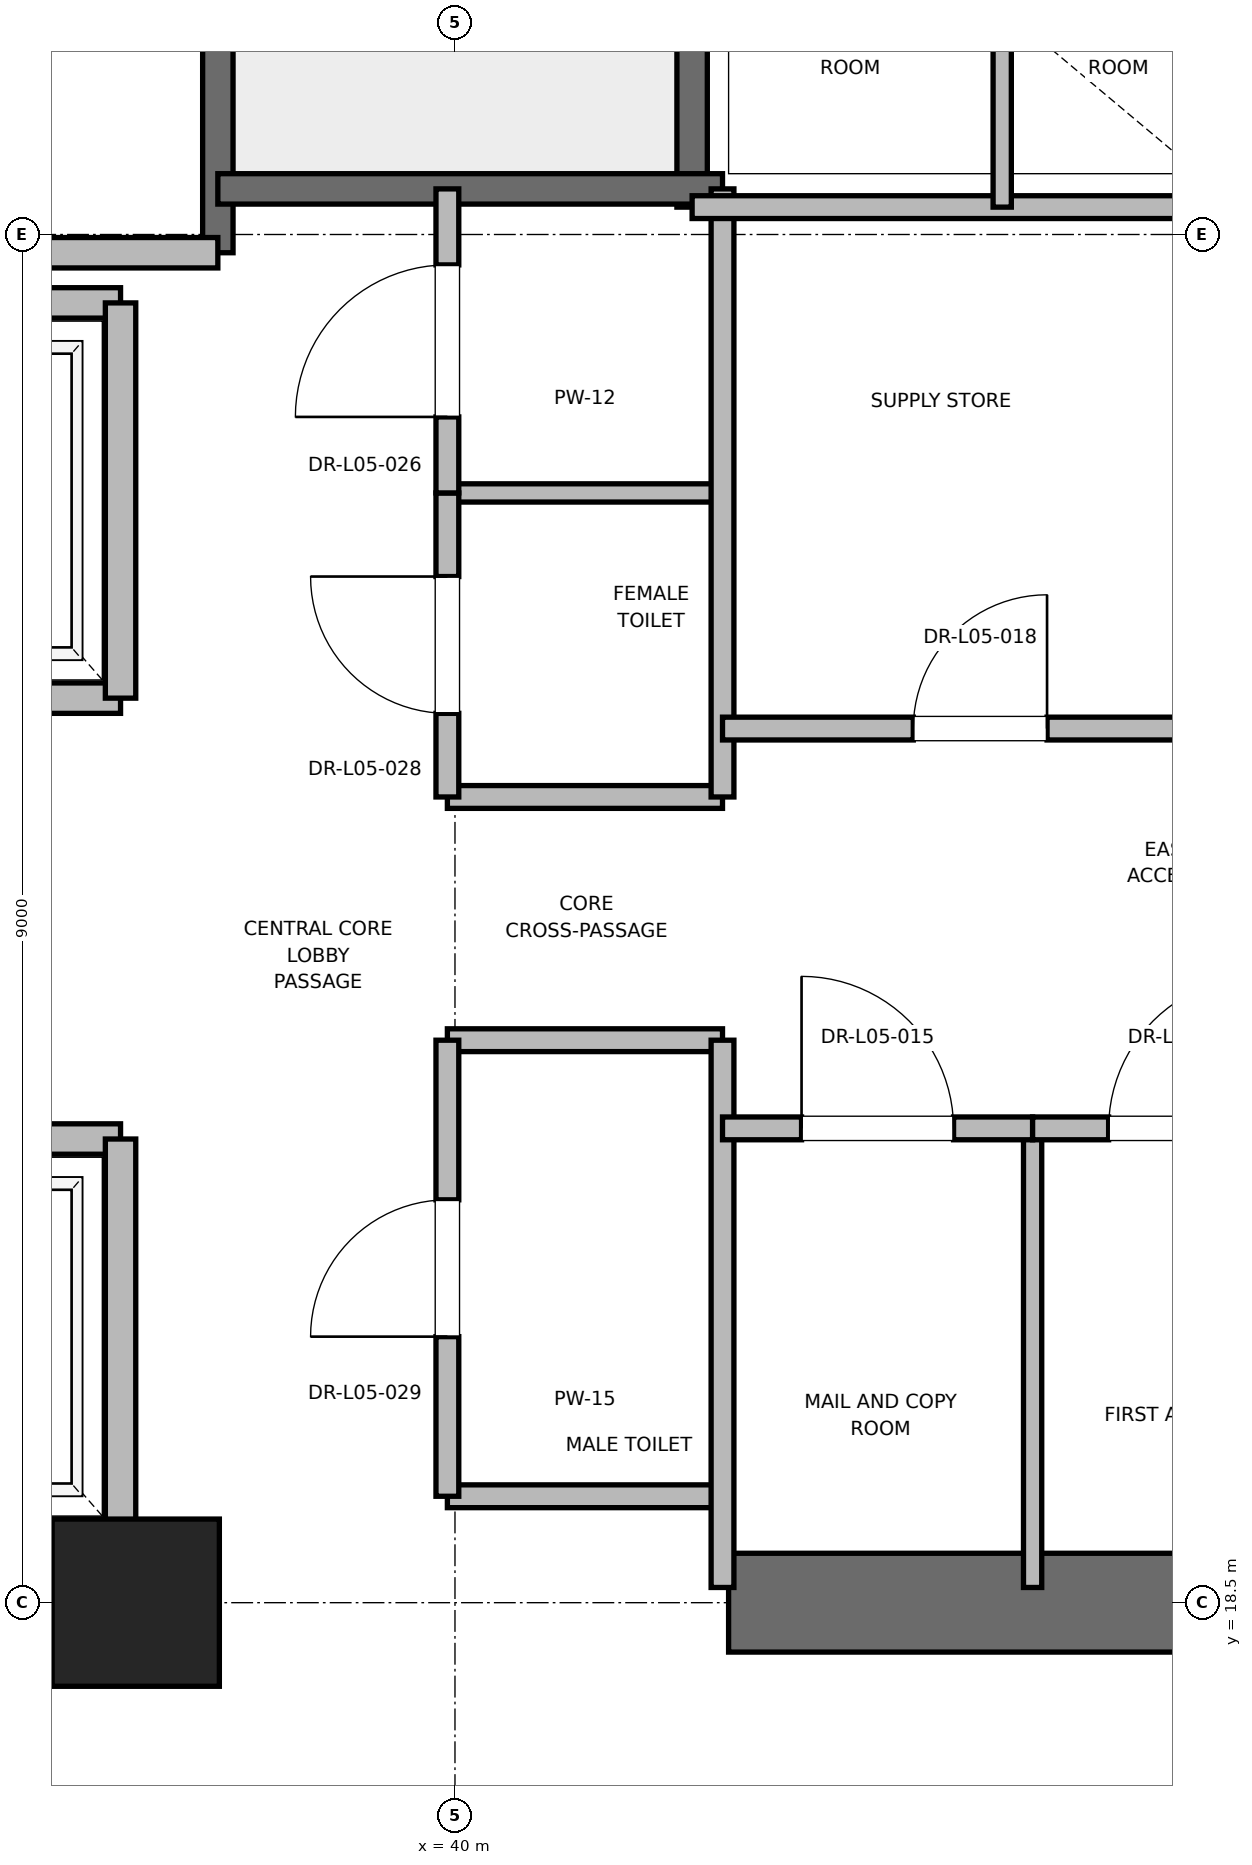
"""IFC4 building model, lengths in metres.
Left out: names, types, materials, properties, quantities, classifications, styles, units other than length and angle.
Written with IfcOpenShell. Run it as: python <this file> out.ifc"""

import sys

from ifc_helpers import new_model, si_unit, direction, frame, frame_2d, origin, origin_2d, place, context, subcontext, project, spatial, rectangle, extrude, element, fill, save


model = new_model("IFC4")
c1 = context("Model", 3, precision=1e-05, world=origin(), true_north=direction((0.0, 1.0)))
c2 = subcontext(c1, "Body", "Model", "MODEL_VIEW")
j1 = project(units=[si_unit("LENGTHUNIT", "METRE"), si_unit("PLANEANGLEUNIT", "RADIAN")], contexts=[c1])
p1 = place(None, origin())
s1 = spatial("IfcSite", under=j1, at=p1, CompositionType="ELEMENT")
p2 = place(p1, origin())
s2 = spatial("IfcBuilding", under=s1, at=p2, CompositionType="ELEMENT")
p3 = place(p2, frame((0.0, 0.0, 27.6)))
s3 = spatial("IfcBuildingStorey", under=s2, at=p3, CompositionType="ELEMENT", Elevation=27.6)
p4 = place(p3, frame((37.9, 18.5, 0.0), z_axis=(0.0, 0.0, 1.0), x_axis=(1.0, 0.0, 0.0)))
e1 = element("IfcColumn", 1, at=p4, inside=s3, PredefinedType="PILASTER", context=c2, shape_type="SweptSolid", body=[
    extrude(rectangle(XDim=1.1, YDim=1.1, at=origin_2d()), origin(), (0.0, 0.0, 1.0), 4.0),
])
for number, where, z_axis, x_axis in (
    (2, (29.0, 18.5, 0.0), (0.0, 0.0, 1.0), (1.0, 0.0, 0.0)),
    (3, (41.8, 18.5, 0.0), (0.0, 0.0, 1.0), (1.0, 0.0, 0.0)),
):
    element("IfcWall", number, at=place(p3, frame(where, z_axis=z_axis, x_axis=x_axis)), inside=s3, PredefinedType="SHEAR", context=c2, shape_type="SweptSolid", body=[
        extrude(rectangle(XDim=9.2, YDim=0.65, at=frame_2d((4.6, 0.0))), origin(), (0.0, 0.0, 1.0), 3.76),
    ])
p5 = place(p3, frame((38.44, 27.38, 0.0), z_axis=(0.0, 0.0, 1.0), x_axis=(0.0, 1.0, 0.0)))
e4 = element("IfcWall", 4, at=p5, inside=s3, PredefinedType="SOLIDWALL", context=c2, shape_type="SweptSolid", body=[
    extrude(rectangle(XDim=8.87, YDim=0.2, at=frame_2d((4.435, 0.0))), origin(), (0.0, 0.0, 1.0), 3.76),
])
p6 = place(p3, frame((41.56, 27.68, 0.0), z_axis=(0.0, 0.0, 1.0), x_axis=(0.0, 1.0, 0.0)))
e5 = element("IfcWall", 5, at=p6, inside=s3, PredefinedType="SOLIDWALL", context=c2, shape_type="SweptSolid", body=[
    extrude(rectangle(XDim=8.57, YDim=0.2, at=frame_2d((4.285, 0.0))), origin(), (0.0, 0.0, 1.0), 3.76),
])
p7 = place(p3, frame((38.44, 27.8, 0.0), z_axis=(0.0, 0.0, 1.0), x_axis=(1.0, 0.0, 0.0)))
e6 = element("IfcWall", 6, at=p7, inside=s3, PredefinedType="SOLIDWALL", context=c2, shape_type="SweptSolid", body=[
    extrude(rectangle(XDim=3.32, YDim=0.2, at=frame_2d((1.66, 0.0))), origin(), (0.0, 0.0, 1.0), 3.76),
])
p8 = place(p3, frame((32.82, 27.38, 0.0), z_axis=(0.0, 0.0, 1.0), x_axis=(1.0, 0.0, 0.0)))
e7 = element("IfcWall", 7, at=p8, inside=s3, PredefinedType="PARTITIONING", context=c2, shape_type="SweptSolid", body=[
    extrude(rectangle(XDim=5.62, YDim=0.2, at=frame_2d((2.81, 0.0))), origin(), (0.0, 0.0, 1.0), 3.76),
])
p9 = place(p3, frame((35.5, 18.95, 0.0), z_axis=(0.0, 0.0, 1.0), x_axis=(1.0, 0.0, 0.0)))
e8 = element("IfcWall", 8, at=p9, inside=s3, PredefinedType="SOLIDWALL", context=c2, shape_type="SweptSolid", body=[
    extrude(rectangle(XDim=2.3, YDim=0.2, at=frame_2d((1.15, 0.0))), origin(), (0.0, 0.0, 1.0), 2.54),
])
p10 = place(p3, frame((37.8, 21.55, 0.0), z_axis=(0.0, 0.0, 1.0), x_axis=(-1.0, 0.0, 0.0)))
e9 = element("IfcWall", 9, at=p10, inside=s3, PredefinedType="SOLIDWALL", context=c2, shape_type="SweptSolid", body=[
    extrude(rectangle(XDim=2.3, YDim=0.2, at=frame_2d((1.15, 0.0))), origin(), (0.0, 0.0, 1.0), 3.76),
])
p11 = place(p10, frame((0.6, 0.0, 0.0)))
e10 = element("IfcOpeningElement", 10, at=p11, cuts=e9, PredefinedType="OPENING", context=c2, shape_type="SweptSolid", body=[
    extrude(rectangle(XDim=1.1, YDim=2.2, at=frame_2d((0.55, 1.1))), frame((0.0, 0.1, 0.0), z_axis=(0.0, -1.0, 0.0), x_axis=(1.0, 0.0, 0.0)), (0.0, 0.0, 1.0), 0.2),
])
p12 = place(p3, frame((37.8, 18.95, 0.0), z_axis=(0.0, 0.0, 1.0), x_axis=(0.0, 1.0, 0.0)))
e11 = element("IfcWall", 11, at=p12, inside=s3, PredefinedType="SOLIDWALL", context=c2, shape_type="SweptSolid", body=[
    extrude(rectangle(XDim=2.6, YDim=0.2, at=frame_2d((1.3, 0.0))), origin(), (0.0, 0.0, 1.0), 2.54),
])
p13 = place(p3, frame((35.5, 24.45, 0.0), z_axis=(0.0, 0.0, 1.0), x_axis=(1.0, 0.0, 0.0)))
e12 = element("IfcWall", 12, at=p13, inside=s3, PredefinedType="SOLIDWALL", context=c2, shape_type="SweptSolid", body=[
    extrude(rectangle(XDim=2.3, YDim=0.2, at=frame_2d((1.15, 0.0))), origin(), (0.0, 0.0, 1.0), 3.76),
])
p14 = place(p13, frame((0.6, 0.0, 0.0)))
e13 = element("IfcOpeningElement", 13, at=p14, cuts=e12, PredefinedType="OPENING", context=c2, shape_type="SweptSolid", body=[
    extrude(rectangle(XDim=1.1, YDim=2.2, at=frame_2d((0.55, 1.1))), frame((0.0, 0.1, 0.0), z_axis=(0.0, -1.0, 0.0), x_axis=(1.0, 0.0, 0.0)), (0.0, 0.0, 1.0), 0.2),
])
p15 = place(p3, frame((37.8, 27.05, 0.0), z_axis=(0.0, 0.0, 1.0), x_axis=(-1.0, 0.0, 0.0)))
e14 = element("IfcWall", 14, at=p15, inside=s3, PredefinedType="SOLIDWALL", context=c2, shape_type="SweptSolid", body=[
    extrude(rectangle(XDim=2.3, YDim=0.2, at=frame_2d((1.15, 0.0))), origin(), (0.0, 0.0, 1.0), 3.76),
])
p16 = place(p3, frame((37.8, 24.45, 0.0), z_axis=(0.0, 0.0, 1.0), x_axis=(0.0, 1.0, 0.0)))
e15 = element("IfcWall", 15, at=p16, inside=s3, PredefinedType="SOLIDWALL", context=c2, shape_type="SweptSolid", body=[
    extrude(rectangle(XDim=2.6, YDim=0.2, at=frame_2d((1.3, 0.0))), origin(), (0.0, 0.0, 1.0), 3.76),
])
for number, where, z_axis, x_axis in (
    (16, (39.95, 19.2, 0.0), (0.0, 0.0, 1.0), (1.0, 0.0, 0.0)),
    (17, (39.95, 22.2, 0.0), (0.0, 0.0, 1.0), (1.0, 0.0, 0.0)),
    (18, (39.95, 23.8, 0.0), (0.0, 0.0, 1.0), (1.0, 0.0, 0.0)),
):
    element("IfcWall", number, at=place(p3, frame(where, z_axis=z_axis, x_axis=x_axis)), inside=s3, PredefinedType="PARTITIONING", context=c2, shape_type="SweptSolid", body=[
        extrude(rectangle(XDim=1.81, YDim=0.15, at=frame_2d((0.905, 0.0))), origin(), (0.0, 0.0, 1.0), 2.85),
    ])
p17 = place(p3, frame((39.95, 25.8, 0.0), z_axis=(0.0, 0.0, 1.0), x_axis=(1.0, 0.0, 0.0)))
e19 = element("IfcWall", 19, at=p17, inside=s3, PredefinedType="PARTITIONING", context=c2, shape_type="SweptSolid", body=[
    extrude(rectangle(XDim=1.81, YDim=0.12, at=frame_2d((0.905, 0.0))), origin(), (0.0, 0.0, 1.0), 2.85),
])
p18 = place(p3, frame((41.76, 18.6, 0.0), z_axis=(0.0, 0.0, 1.0), x_axis=(0.0, 1.0, 0.0)))
e20 = element("IfcWall", 20, at=p18, inside=s3, PredefinedType="PARTITIONING", context=c2, shape_type="SweptSolid", body=[
    extrude(rectangle(XDim=3.6, YDim=0.15, at=frame_2d((1.8, 0.0))), origin(), (0.0, 0.0, 1.0), 2.54),
])
p19 = place(p3, frame((41.76, 23.8, 0.0), z_axis=(0.0, 0.0, 1.0), x_axis=(0.0, 1.0, 0.0)))
e21 = element("IfcWall", 21, at=p19, inside=s3, PredefinedType="PARTITIONING", context=c2, shape_type="SweptSolid", body=[
    extrude(rectangle(XDim=4.0, YDim=0.15, at=frame_2d((2.0, 0.0))), origin(), (0.0, 0.0, 1.0), 2.85),
])
p20 = place(p3, frame((39.95, 19.2, 0.0), z_axis=(0.0, 0.0, 1.0), x_axis=(0.0, 1.0, 0.0)))
e22 = element("IfcWall", 22, at=p20, inside=s3, PredefinedType="PARTITIONING", context=c2, shape_type="SweptSolid", body=[
    extrude(rectangle(XDim=3.0, YDim=0.15, at=frame_2d((1.5, 0.0))), origin(), (0.0, 0.0, 1.0), 2.85),
])
p21 = place(p20, frame((1.05, 0.0, 0.0)))
e23 = element("IfcOpeningElement", 23, at=p21, cuts=e22, PredefinedType="OPENING", context=c2, shape_type="SweptSolid", body=[
    extrude(rectangle(XDim=0.9, YDim=2.1, at=frame_2d((0.45, 1.05))), frame((0.0, 0.075, 0.0), z_axis=(0.0, -1.0, 0.0), x_axis=(1.0, 0.0, 0.0)), (0.0, 0.0, 1.0), 0.15),
])
p22 = place(p3, frame((39.95, 23.8, 0.0), z_axis=(0.0, 0.0, 1.0), x_axis=(0.0, 1.0, 0.0)))
e24 = element("IfcWall", 24, at=p22, inside=s3, PredefinedType="PARTITIONING", context=c2, shape_type="SweptSolid", body=[
    extrude(rectangle(XDim=2.0, YDim=0.15, at=frame_2d((1.0, 0.0))), origin(), (0.0, 0.0, 1.0), 2.85),
])
p23 = place(p22, frame((0.55, 0.0, 0.0)))
e25 = element("IfcOpeningElement", 25, at=p23, cuts=e24, PredefinedType="OPENING", context=c2, shape_type="SweptSolid", body=[
    extrude(rectangle(XDim=0.9, YDim=2.1, at=frame_2d((0.45, 1.05))), frame((0.0, 0.075, 0.0), z_axis=(0.0, -1.0, 0.0), x_axis=(1.0, 0.0, 0.0)), (0.0, 0.0, 1.0), 0.15),
])
p24 = place(p3, frame((39.95, 25.8, 0.0), z_axis=(0.0, 0.0, 1.0), x_axis=(0.0, 1.0, 0.0)))
e26 = element("IfcWall", 26, at=p24, inside=s3, PredefinedType="PARTITIONING", context=c2, shape_type="SweptSolid", body=[
    extrude(rectangle(XDim=2.0, YDim=0.15, at=frame_2d((1.0, 0.0))), origin(), (0.0, 0.0, 1.0), 2.85),
])
p25 = place(p24, frame((0.5, 0.0, 0.0)))
e27 = element("IfcOpeningElement", 27, at=p25, cuts=e26, PredefinedType="OPENING", context=c2, shape_type="SweptSolid", body=[
    extrude(rectangle(XDim=1.0, YDim=2.15, at=frame_2d((0.5, 1.075))), frame((0.0, 0.075, 0.0), z_axis=(0.0, -1.0, 0.0), x_axis=(1.0, 0.0, 0.0)), (0.0, 0.0, 1.0), 0.15),
])
p26 = place(p3, frame((41.56, 27.68, 0.0), z_axis=(0.0, 0.0, 1.0), x_axis=(1.0, 0.0, 0.0)))
e28 = element("IfcWall", 28, at=p26, inside=s3, PredefinedType="PARTITIONING", context=c2, shape_type="SweptSolid", body=[
    extrude(rectangle(XDim=3.59, YDim=0.15, at=frame_2d((1.795, 0.0))), origin(), (0.0, 0.0, 1.0), 2.85),
])
p27 = place(p3, frame((43.8, 18.6, 0.0), z_axis=(0.0, 0.0, 1.0), x_axis=(0.0, 1.0, 0.0)))
e29 = element("IfcWall", 29, at=p27, inside=s3, PredefinedType="PARTITIONING", context=c2, shape_type="SweptSolid", body=[
    extrude(rectangle(XDim=3.02, YDim=0.12, at=frame_2d((1.51, 0.0))), origin(), (0.0, 0.0, 1.0), 2.85),
])
p28 = place(p3, frame((41.76, 21.62, 0.0), z_axis=(0.0, 0.0, 1.0), x_axis=(1.0, 0.0, 0.0)))
e30 = element("IfcWall", 30, at=p28, inside=s3, PredefinedType="PARTITIONING", context=c2, shape_type="SweptSolid", body=[
    extrude(rectangle(XDim=2.04, YDim=0.15, at=frame_2d((1.02, 0.0))), origin(), (0.0, 0.0, 1.0), 2.85),
])
p29 = place(p28, frame((0.52, 0.0, 0.0)))
e31 = element("IfcOpeningElement", 31, at=p29, cuts=e30, PredefinedType="OPENING", context=c2, shape_type="SweptSolid", body=[
    extrude(rectangle(XDim=1.0, YDim=2.15, at=frame_2d((0.5, 1.075))), frame((0.0, 0.075, 0.0), z_axis=(0.0, -1.0, 0.0), x_axis=(1.0, 0.0, 0.0)), (0.0, 0.0, 1.0), 0.15),
])
p30 = place(p3, frame((43.8, 21.62, 0.0), z_axis=(0.0, 0.0, 1.0), x_axis=(1.0, 0.0, 0.0)))
e32 = element("IfcWall", 32, at=p30, inside=s3, PredefinedType="PARTITIONING", context=c2, shape_type="SweptSolid", body=[
    extrude(rectangle(XDim=2.0, YDim=0.15, at=frame_2d((1.0, 0.0))), origin(), (0.0, 0.0, 1.0), 2.85),
])
p31 = place(p30, frame((0.5, 0.0, 0.0)))
e33 = element("IfcOpeningElement", 33, at=p31, cuts=e32, PredefinedType="OPENING", context=c2, shape_type="SweptSolid", body=[
    extrude(rectangle(XDim=1.0, YDim=2.15, at=frame_2d((0.5, 1.075))), frame((0.0, 0.075, 0.0), z_axis=(0.0, -1.0, 0.0), x_axis=(1.0, 0.0, 0.0)), (0.0, 0.0, 1.0), 0.15),
])
p32 = place(p3, frame((41.76, 24.25, 0.0), z_axis=(0.0, 0.0, 1.0), x_axis=(1.0, 0.0, 0.0)))
e34 = element("IfcWall", 34, at=p32, inside=s3, PredefinedType="PARTITIONING", context=c2, shape_type="SweptSolid", body=[
    extrude(rectangle(XDim=3.39, YDim=0.15, at=frame_2d((1.695, 0.0))), origin(), (0.0, 0.0, 1.0), 2.85),
])
p33 = place(p32, frame((1.255, 0.0, 0.0)))
e35 = element("IfcOpeningElement", 35, at=p33, cuts=e34, PredefinedType="OPENING", context=c2, shape_type="SweptSolid", body=[
    extrude(rectangle(XDim=0.88, YDim=2.1, at=frame_2d((0.44, 1.05))), frame((0.0, 0.075, 0.0), z_axis=(0.0, -1.0, 0.0), x_axis=(1.0, 0.0, 0.0)), (0.0, 0.0, 1.0), 0.15),
])
p34 = place(p3, frame((43.6, 27.68, 0.0), z_axis=(0.0, 0.0, 1.0), x_axis=(0.0, 1.0, 0.0)))
e36 = element("IfcWall", 36, at=p34, inside=s3, PredefinedType="PARTITIONING", context=c2, shape_type="SweptSolid", body=[
    extrude(rectangle(XDim=3.04, YDim=0.12, at=frame_2d((1.52, 0.0))), origin(), (0.0, 0.0, 1.0), 2.85),
])
p35 = place(p21, origin())
e37 = element("IfcDoor", 37, at=p35, inside=s3, OperationType="SINGLE_SWING_LEFT", PredefinedType="DOOR", context=c2, shape_type="SweptSolid", body=[
    extrude(rectangle(XDim=0.9, YDim=2.1, at=frame_2d((0.45, 1.05))), frame((0.0, 0.025, 0.0), z_axis=(0.0, -1.0, 0.0), x_axis=(1.0, 0.0, 0.0)), (0.0, 0.0, 1.0), 0.05),
])
fill(e23, e37)
p36 = place(p23, origin())
e38 = element("IfcDoor", 38, at=p36, inside=s3, OperationType="SINGLE_SWING_RIGHT", PredefinedType="DOOR", context=c2, shape_type="SweptSolid", body=[
    extrude(rectangle(XDim=0.9, YDim=2.1, at=frame_2d((0.45, 1.05))), frame((0.0, 0.025, 0.0), z_axis=(0.0, -1.0, 0.0), x_axis=(1.0, 0.0, 0.0)), (0.0, 0.0, 1.0), 0.05),
])
fill(e25, e38)
p37 = place(p25, origin())
e39 = element("IfcDoor", 39, at=p37, inside=s3, OperationType="SINGLE_SWING_LEFT", PredefinedType="DOOR", context=c2, shape_type="SweptSolid", body=[
    extrude(rectangle(XDim=1.0, YDim=2.15, at=frame_2d((0.5, 1.075))), frame((0.0, 0.025, 0.0), z_axis=(0.0, -1.0, 0.0), x_axis=(1.0, 0.0, 0.0)), (0.0, 0.0, 1.0), 0.05),
])
fill(e27, e39)
p38 = place(p29, origin())
e40 = element("IfcDoor", 40, at=p38, inside=s3, OperationType="SINGLE_SWING_LEFT", PredefinedType="DOOR", context=c2, shape_type="SweptSolid", body=[
    extrude(rectangle(XDim=1.0, YDim=2.15, at=frame_2d((0.5, 1.075))), frame((0.0, 0.025, 0.0), z_axis=(0.0, -1.0, 0.0), x_axis=(1.0, 0.0, 0.0)), (0.0, 0.0, 1.0), 0.05),
])
fill(e31, e40)
p39 = place(p31, origin())
e41 = element("IfcDoor", 41, at=p39, inside=s3, OperationType="SINGLE_SWING_RIGHT", PredefinedType="DOOR", context=c2, shape_type="SweptSolid", body=[
    extrude(rectangle(XDim=1.0, YDim=2.15, at=frame_2d((0.5, 1.075))), frame((0.0, 0.025, 0.0), z_axis=(0.0, -1.0, 0.0), x_axis=(1.0, 0.0, 0.0)), (0.0, 0.0, 1.0), 0.05),
])
fill(e33, e41)
p40 = place(p33, origin())
e42 = element("IfcDoor", 42, at=p40, inside=s3, OperationType="SINGLE_SWING_RIGHT", PredefinedType="DOOR", context=c2, shape_type="SweptSolid", body=[
    extrude(rectangle(XDim=0.88, YDim=2.1, at=frame_2d((0.44, 1.05))), frame((0.0, 0.025, 0.0), z_axis=(0.0, -1.0, 0.0), x_axis=(1.0, 0.0, 0.0)), (0.0, 0.0, 1.0), 0.05),
])
fill(e35, e42)
save(model, sys.argv[1])
